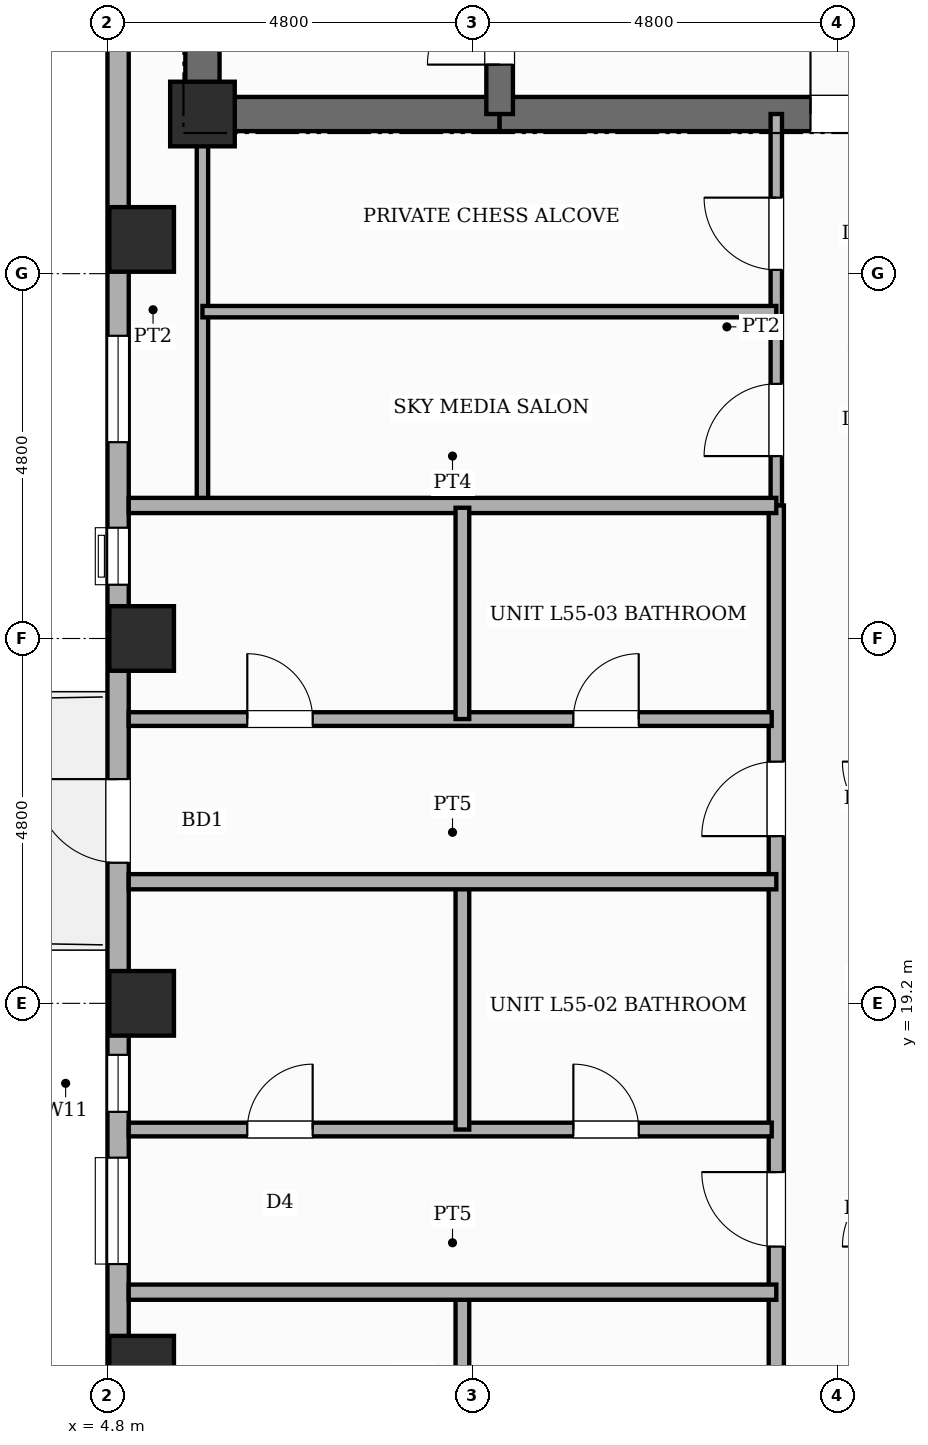
"""IFC4 building model, lengths in metres.
Left out: names, types, materials, properties, quantities, classifications, styles, units other than length and angle.
Written with IfcOpenShell. Run it as: python <this file> out.ifc"""

import sys

from ifc_helpers import new_model, si_unit, direction, frame, frame_2d, origin, origin_2d, place, context, subcontext, project, spatial, rectangle, extrude, element, fill, save


model = new_model("IFC4")
c1 = context("Model", 3, precision=1e-05, world=origin(), true_north=direction((0.0, 1.0)))
c2 = subcontext(c1, "Body", "Model", "MODEL_VIEW")
j1 = project(units=[si_unit("LENGTHUNIT", "METRE"), si_unit("PLANEANGLEUNIT", "RADIAN")], contexts=[c1])
p1 = place(None, origin())
s1 = spatial("IfcSite", under=j1, at=p1, CompositionType="ELEMENT")
p2 = place(p1, origin())
s2 = spatial("IfcBuilding", under=s1, at=p2, CompositionType="ELEMENT")
p3 = place(p2, frame((0.0, 0.0, 211.0)))
s3 = spatial("IfcBuildingStorey", under=s2, at=p3, CompositionType="ELEMENT", Elevation=211.0)
p4 = place(p3, frame((6.05, 30.675, 0.0), z_axis=(0.0, 0.0, 1.0), x_axis=(0.0, 1.0, 0.0)))
e1 = element("IfcWall", 1, at=p4, inside=s3, PredefinedType="SHEAR", context=c2, shape_type="SweptSolid", body=[
    extrude(rectangle(XDim=15.35, YDim=0.45, at=frame_2d((7.675, 0.0))), origin(), (0.0, 0.0, 1.0), 3.6),
])
p5 = place(p4, frame((10.675, 0.0, 0.0)))
e2 = element("IfcOpeningElement", 2, at=p5, cuts=e1, PredefinedType="OPENING", context=c2, shape_type="SweptSolid", body=[
    extrude(rectangle(XDim=0.95, YDim=2.15, at=frame_2d((0.475, 1.075))), frame((0.0, 0.235, 0.0), z_axis=(0.0, -1.0, 0.0), x_axis=(1.0, 0.0, 0.0)), (0.0, 0.0, 1.0), 0.47),
])
p6 = place(p3, frame((6.05, 30.9, 0.0), z_axis=(0.0, 0.0, 1.0), x_axis=(1.0, 0.0, 0.0)))
e3 = element("IfcWall", 3, at=p6, inside=s3, PredefinedType="SHEAR", context=c2, shape_type="SweptSolid", body=[
    extrude(rectangle(XDim=3.91, YDim=0.45, at=frame_2d((1.955, 0.0))), origin(), (0.0, 0.0, 1.0), 3.6),
])
p7 = place(p3, frame((9.96, 30.9, 0.0), z_axis=(0.0, 0.0, 1.0), x_axis=(1.0, 0.0, 0.0)))
e4 = element("IfcWall", 4, at=p7, inside=s3, PredefinedType="SHEAR", context=c2, shape_type="SweptSolid", body=[
    extrude(rectangle(XDim=8.88, YDim=0.45, at=frame_2d((4.44, 0.0))), origin(), (0.0, 0.0, 1.0), 3.6),
])
p8 = place(p7, frame((4.09, 0.0, 0.0)))
e5 = element("IfcOpeningElement", 5, at=p8, cuts=e4, PredefinedType="OPENING", context=c2, shape_type="SweptSolid", body=[
    extrude(rectangle(XDim=1.0, YDim=2.15, at=frame_2d((0.5, 1.075))), frame((0.0, 0.235, 0.0), z_axis=(0.0, -1.0, 0.0), x_axis=(1.0, 0.0, 0.0)), (0.0, 0.0, 1.0), 0.47),
])
p9 = place(p3, frame((9.96, 30.9, 0.0), z_axis=(0.0, 0.0, 1.0), x_axis=(0.0, 1.0, 0.0)))
e6 = element("IfcWall", 6, at=p9, inside=s3, PredefinedType="SHEAR", context=c2, shape_type="SweptSolid", body=[
    extrude(rectangle(XDim=14.9, YDim=0.35, at=frame_2d((7.45, 0.0))), origin(), (0.0, 0.0, 1.0), 3.6),
])
p10 = place(p9, frame((0.65, 0.0, 0.0)))
e7 = element("IfcOpeningElement", 7, at=p10, cuts=e6, PredefinedType="OPENING", context=c2, shape_type="SweptSolid", body=[
    extrude(rectangle(XDim=0.95, YDim=2.1, at=frame_2d((0.475, 1.05))), frame((0.0, 0.185, 0.0), z_axis=(0.0, -1.0, 0.0), x_axis=(1.0, 0.0, 0.0)), (0.0, 0.0, 1.0), 0.37),
])
p11 = place(p9, frame((10.45, 0.0, 0.0)))
e8 = element("IfcOpeningElement", 8, at=p11, cuts=e6, PredefinedType="OPENING", context=c2, shape_type="SweptSolid", body=[
    extrude(rectangle(XDim=1.0, YDim=2.15, at=frame_2d((0.5, 1.075))), frame((0.0, 0.185, 0.0), z_axis=(0.0, -1.0, 0.0), x_axis=(1.0, 0.0, 0.0)), (0.0, 0.0, 1.0), 0.37),
])
for number, where, z_axis, x_axis in (
    (9, (5.25, 14.4, 0.0), (0.0, 0.0, 1.0), (1.0, 0.0, 0.0)),
    (10, (5.25, 19.2, 0.0), (0.0, 0.0, 1.0), (1.0, 0.0, 0.0)),
    (11, (5.25, 24.0, 0.0), (0.0, 0.0, 1.0), (1.0, 0.0, 0.0)),
    (12, (5.25, 29.25, 0.0), (0.0, 0.0, 1.0), (1.0, 0.0, 0.0)),
    (13, (6.05, 30.9, 0.0), (0.0, 0.0, 1.0), (1.0, 0.0, 0.0)),
):
    element("IfcColumn", number, at=place(p3, frame(where, z_axis=z_axis, x_axis=x_axis)), inside=s3, PredefinedType="COLUMN", context=c2, shape_type="SweptSolid", body=[
        extrude(rectangle(XDim=0.85, YDim=0.85, at=origin_2d()), origin(), (0.0, 0.0, 1.0), 3.6),
    ])
p12 = place(p3, frame((4.94, 12.0, 0.0), z_axis=(0.0, 0.0, 1.0), x_axis=(0.0, 1.0, 0.0)))
e14 = element("IfcWall", 14, at=p12, inside=s3, PredefinedType="STANDARD", context=c2, shape_type="SweptSolid", body=[
    extrude(rectangle(XDim=33.6, YDim=0.28, at=frame_2d((16.8, 0.0))), origin(), (0.0, 0.0, 1.0), 2.66),
])
p13 = place(p12, frame((9.05, 0.0, 0.0)))
e15 = element("IfcOpeningElement", 15, at=p13, cuts=e14, PredefinedType="OPENING", context=c2, shape_type="SweptSolid", body=[
    extrude(rectangle(XDim=1.1, YDim=2.15, at=frame_2d((0.55, 1.075))), frame((0.0, 0.15, 0.0), z_axis=(0.0, -1.0, 0.0), x_axis=(1.0, 0.0, 0.0)), (0.0, 0.0, 1.0), 0.3),
])
p14 = place(p12, frame((3.77, 0.0, 0.65)))
e16 = element("IfcOpeningElement", 16, at=p14, cuts=e14, PredefinedType="OPENING", context=c2, shape_type="SweptSolid", body=[
    extrude(rectangle(XDim=1.4, YDim=1.1, at=frame_2d((0.7, 0.55))), frame((0.0, 0.15, 0.0), z_axis=(0.0, -1.0, 0.0), x_axis=(1.0, 0.0, 0.0)), (0.0, 0.0, 1.0), 0.3),
])
p15 = place(p12, frame((0.731, 0.0, 0.45)))
e17 = element("IfcOpeningElement", 17, at=p15, cuts=e14, PredefinedType="OPENING", context=c2, shape_type="SweptSolid", body=[
    extrude(rectangle(XDim=0.95, YDim=1.8, at=frame_2d((0.475, 0.9))), frame((0.0, 0.15, 0.0), z_axis=(0.0, -1.0, 0.0), x_axis=(1.0, 0.0, 0.0)), (0.0, 0.0, 1.0), 0.3),
])
p16 = place(p12, frame((5.772, 0.0, 0.45)))
e18 = element("IfcOpeningElement", 18, at=p16, cuts=e14, PredefinedType="OPENING", context=c2, shape_type="SweptSolid", body=[
    extrude(rectangle(XDim=0.75, YDim=1.8, at=frame_2d((0.375, 0.9))), frame((0.0, 0.15, 0.0), z_axis=(0.0, -1.0, 0.0), x_axis=(1.0, 0.0, 0.0)), (0.0, 0.0, 1.0), 0.3),
])
p17 = place(p12, frame((12.708, 0.0, 0.45)))
e19 = element("IfcOpeningElement", 19, at=p17, cuts=e14, PredefinedType="OPENING", context=c2, shape_type="SweptSolid", body=[
    extrude(rectangle(XDim=0.75, YDim=1.8, at=frame_2d((0.375, 0.9))), frame((0.0, 0.15, 0.0), z_axis=(0.0, -1.0, 0.0), x_axis=(1.0, 0.0, 0.0)), (0.0, 0.0, 1.0), 0.3),
])
p18 = place(p12, frame((14.583, 0.0, 0.65)))
e20 = element("IfcOpeningElement", 20, at=p18, cuts=e14, PredefinedType="OPENING", context=c2, shape_type="SweptSolid", body=[
    extrude(rectangle(XDim=1.4, YDim=1.1, at=frame_2d((0.7, 0.55))), frame((0.0, 0.15, 0.0), z_axis=(0.0, -1.0, 0.0), x_axis=(1.0, 0.0, 0.0)), (0.0, 0.0, 1.0), 0.3),
])
p19 = place(p3, frame((13.6, 25.75, 0.0), z_axis=(0.0, 0.0, 1.0), x_axis=(0.0, 1.0, 0.0)))
e21 = element("IfcWall", 21, at=p19, inside=s3, PredefinedType="PARTITIONING", context=c2, shape_type="SweptSolid", body=[
    extrude(rectangle(XDim=5.15, YDim=0.15, at=frame_2d((2.575, 0.0))), origin(), (0.0, 0.0, 1.0), 3.38),
])
p20 = place(p19, frame((0.65, 0.0, 0.0)))
e22 = element("IfcOpeningElement", 22, at=p20, cuts=e21, PredefinedType="OPENING", context=c2, shape_type="SweptSolid", body=[
    extrude(rectangle(XDim=0.95, YDim=2.15, at=frame_2d((0.475, 1.075))), frame((0.0, 0.085, 0.0), z_axis=(0.0, -1.0, 0.0), x_axis=(1.0, 0.0, 0.0)), (0.0, 0.0, 1.0), 0.17),
])
p21 = place(p19, frame((3.1, 0.0, 0.0)))
e23 = element("IfcOpeningElement", 23, at=p21, cuts=e21, PredefinedType="OPENING", context=c2, shape_type="SweptSolid", body=[
    extrude(rectangle(XDim=0.95, YDim=2.15, at=frame_2d((0.475, 1.075))), frame((0.0, 0.085, 0.0), z_axis=(0.0, -1.0, 0.0), x_axis=(1.0, 0.0, 0.0)), (0.0, 0.0, 1.0), 0.17),
])
p22 = place(p3, frame((6.05, 25.75, 0.0), z_axis=(0.0, 0.0, 1.0), x_axis=(0.0, 1.0, 0.0)))
e24 = element("IfcWall", 24, at=p22, inside=s3, PredefinedType="PARTITIONING", context=c2, shape_type="SweptSolid", body=[
    extrude(rectangle(XDim=5.15, YDim=0.15, at=frame_2d((2.575, 0.0))), origin(), (0.0, 0.0, 1.0), 3.38),
])
p23 = place(p3, frame((6.05, 28.3, 0.0), z_axis=(0.0, 0.0, 1.0), x_axis=(1.0, 0.0, 0.0)))
e25 = element("IfcWall", 25, at=p23, inside=s3, PredefinedType="PARTITIONING", context=c2, shape_type="SweptSolid", body=[
    extrude(rectangle(XDim=7.55, YDim=0.15, at=frame_2d((3.775, 0.0))), origin(), (0.0, 0.0, 1.0), 3.38),
])
p24 = place(p3, frame((13.6, 9.88, 0.0), z_axis=(0.0, 0.0, 1.0), x_axis=(0.0, 1.0, 0.0)))
e26 = element("IfcWall", 26, at=p24, inside=s3, PredefinedType="PARTITIONING", context=c2, shape_type="SweptSolid", body=[
    extrude(rectangle(XDim=15.87, YDim=0.2, at=frame_2d((7.935, 0.0))), origin(), (0.0, 0.0, 1.0), 3.38),
])
p25 = place(p24, frame((0.949, 0.0, 0.0)))
e27 = element("IfcOpeningElement", 27, at=p25, cuts=e26, PredefinedType="OPENING", context=c2, shape_type="SweptSolid", body=[
    extrude(rectangle(XDim=0.98, YDim=2.18, at=frame_2d((0.49, 1.09))), frame((0.0, 0.11, 0.0), z_axis=(0.0, -1.0, 0.0), x_axis=(1.0, 0.0, 0.0)), (0.0, 0.0, 1.0), 0.22),
])
p26 = place(p24, frame((6.12, 0.0, 0.0)))
e28 = element("IfcOpeningElement", 28, at=p26, cuts=e26, PredefinedType="OPENING", context=c2, shape_type="SweptSolid", body=[
    extrude(rectangle(XDim=0.98, YDim=2.18, at=frame_2d((0.49, 1.09))), frame((0.0, 0.11, 0.0), z_axis=(0.0, -1.0, 0.0), x_axis=(1.0, 0.0, 0.0)), (0.0, 0.0, 1.0), 0.22),
])
p27 = place(p24, frame((11.52, 0.0, 0.0)))
e29 = element("IfcOpeningElement", 29, at=p27, cuts=e26, PredefinedType="OPENING", context=c2, shape_type="SweptSolid", body=[
    extrude(rectangle(XDim=0.98, YDim=2.18, at=frame_2d((0.49, 1.09))), frame((0.0, 0.11, 0.0), z_axis=(0.0, -1.0, 0.0), x_axis=(1.0, 0.0, 0.0)), (0.0, 0.0, 1.0), 0.22),
])
p28 = place(p3, frame((5.08, 25.75, 0.0), z_axis=(0.0, 0.0, 1.0), x_axis=(1.0, 0.0, 0.0)))
e30 = element("IfcWall", 30, at=p28, inside=s3, PredefinedType="PARTITIONING", context=c2, shape_type="SweptSolid", body=[
    extrude(rectangle(XDim=8.52, YDim=0.2, at=frame_2d((4.26, 0.0))), origin(), (0.0, 0.0, 1.0), 3.38),
])
p29 = place(p3, frame((9.47, 12.458, 0.0), z_axis=(0.0, 0.0, 1.0), x_axis=(0.0, 1.0, 0.0)))
e31 = element("IfcWall", 31, at=p29, inside=s3, PredefinedType="PLUMBINGWALL", context=c2, shape_type="SweptSolid", body=[
    extrude(rectangle(XDim=2.982, YDim=0.18, at=frame_2d((1.491, 0.0))), origin(), (0.0, 0.0, 1.0), 3.38),
])
p30 = place(p3, frame((5.08, 15.4, 0.0), z_axis=(0.0, 0.0, 1.0), x_axis=(1.0, 0.0, 0.0)))
e32 = element("IfcWall", 32, at=p30, inside=s3, PredefinedType="SOLIDWALL", context=c2, shape_type="SweptSolid", body=[
    extrude(rectangle(XDim=8.52, YDim=0.2, at=frame_2d((4.26, 0.0))), origin(), (0.0, 0.0, 1.0), 3.38),
])
p31 = place(p3, frame((5.08, 17.54, 0.0), z_axis=(0.0, 0.0, 1.0), x_axis=(1.0, 0.0, 0.0)))
e33 = element("IfcWall", 33, at=p31, inside=s3, PredefinedType="PLUMBINGWALL", context=c2, shape_type="SweptSolid", body=[
    extrude(rectangle(XDim=8.46, YDim=0.18, at=frame_2d((4.23, 0.0))), origin(), (0.0, 0.0, 1.0), 3.38),
])
p32 = place(p31, frame((1.56, 0.0, 0.0)))
e34 = element("IfcOpeningElement", 34, at=p32, cuts=e33, PredefinedType="OPENING", context=c2, shape_type="SweptSolid", body=[
    extrude(rectangle(XDim=0.86, YDim=2.1, at=frame_2d((0.43, 1.05))), frame((0.0, 0.1, 0.0), z_axis=(0.0, -1.0, 0.0), x_axis=(1.0, 0.0, 0.0)), (0.0, 0.0, 1.0), 0.2),
])
p33 = place(p31, frame((5.85, 0.0, 0.0)))
e35 = element("IfcOpeningElement", 35, at=p33, cuts=e33, PredefinedType="OPENING", context=c2, shape_type="SweptSolid", body=[
    extrude(rectangle(XDim=0.86, YDim=2.1, at=frame_2d((0.43, 1.05))), frame((0.0, 0.1, 0.0), z_axis=(0.0, -1.0, 0.0), x_axis=(1.0, 0.0, 0.0)), (0.0, 0.0, 1.0), 0.2),
])
p34 = place(p3, frame((9.47, 17.54, 0.0), z_axis=(0.0, 0.0, 1.0), x_axis=(0.0, 1.0, 0.0)))
e36 = element("IfcWall", 36, at=p34, inside=s3, PredefinedType="PLUMBINGWALL", context=c2, shape_type="SweptSolid", body=[
    extrude(rectangle(XDim=3.3, YDim=0.18, at=frame_2d((1.65, 0.0))), origin(), (0.0, 0.0, 1.0), 3.38),
])
p35 = place(p3, frame((5.08, 20.8, 0.0), z_axis=(0.0, 0.0, 1.0), x_axis=(1.0, 0.0, 0.0)))
e37 = element("IfcWall", 37, at=p35, inside=s3, PredefinedType="SOLIDWALL", context=c2, shape_type="SweptSolid", body=[
    extrude(rectangle(XDim=8.52, YDim=0.2, at=frame_2d((4.26, 0.0))), origin(), (0.0, 0.0, 1.0), 3.38),
])
p36 = place(p3, frame((5.08, 22.94, 0.0), z_axis=(0.0, 0.0, 1.0), x_axis=(1.0, 0.0, 0.0)))
e38 = element("IfcWall", 38, at=p36, inside=s3, PredefinedType="PLUMBINGWALL", context=c2, shape_type="SweptSolid", body=[
    extrude(rectangle(XDim=8.46, YDim=0.18, at=frame_2d((4.23, 0.0))), origin(), (0.0, 0.0, 1.0), 3.38),
])
p37 = place(p36, frame((1.56, 0.0, 0.0)))
e39 = element("IfcOpeningElement", 39, at=p37, cuts=e38, PredefinedType="OPENING", context=c2, shape_type="SweptSolid", body=[
    extrude(rectangle(XDim=0.86, YDim=2.1, at=frame_2d((0.43, 1.05))), frame((0.0, 0.1, 0.0), z_axis=(0.0, -1.0, 0.0), x_axis=(1.0, 0.0, 0.0)), (0.0, 0.0, 1.0), 0.2),
])
p38 = place(p36, frame((5.85, 0.0, 0.0)))
e40 = element("IfcOpeningElement", 40, at=p38, cuts=e38, PredefinedType="OPENING", context=c2, shape_type="SweptSolid", body=[
    extrude(rectangle(XDim=0.86, YDim=2.1, at=frame_2d((0.43, 1.05))), frame((0.0, 0.1, 0.0), z_axis=(0.0, -1.0, 0.0), x_axis=(1.0, 0.0, 0.0)), (0.0, 0.0, 1.0), 0.2),
])
p39 = place(p3, frame((9.47, 22.94, 0.0), z_axis=(0.0, 0.0, 1.0), x_axis=(0.0, 1.0, 0.0)))
e41 = element("IfcWall", 41, at=p39, inside=s3, PredefinedType="PLUMBINGWALL", context=c2, shape_type="SweptSolid", body=[
    extrude(rectangle(XDim=2.78, YDim=0.18, at=frame_2d((1.39, 0.0))), origin(), (0.0, 0.0, 1.0), 3.38),
])
p40 = place(p13, origin())
e42 = element("IfcDoor", 42, at=p40, inside=s3, OperationType="SINGLE_SWING_RIGHT", PredefinedType="DOOR", context=c2, shape_type="SweptSolid", body=[
    extrude(rectangle(XDim=1.1, YDim=2.15, at=frame_2d((0.55, 1.075))), frame((0.0, 0.025, 0.0), z_axis=(0.0, -1.0, 0.0), x_axis=(1.0, 0.0, 0.0)), (0.0, 0.0, 1.0), 0.05),
])
fill(e15, e42)
p41 = place(p14, origin())
e43 = element("IfcWindow", 43, at=p41, inside=s3, PartitioningType="SINGLE_PANEL", PredefinedType="WINDOW", context=c2, shape_type="SweptSolid", body=[
    extrude(rectangle(XDim=1.4, YDim=1.1, at=frame_2d((0.7, 0.55))), frame((0.0, 0.03, 0.0), z_axis=(0.0, -1.0, 0.0), x_axis=(1.0, 0.0, 0.0)), (0.0, 0.0, 1.0), 0.06),
])
fill(e16, e43)
p42 = place(p16, origin())
e44 = element("IfcWindow", 44, at=p42, inside=s3, PartitioningType="SINGLE_PANEL", PredefinedType="WINDOW", context=c2, shape_type="SweptSolid", body=[
    extrude(rectangle(XDim=0.75, YDim=1.8, at=frame_2d((0.375, 0.9))), frame((0.0, 0.03, 0.0), z_axis=(0.0, -1.0, 0.0), x_axis=(1.0, 0.0, 0.0)), (0.0, 0.0, 1.0), 0.06),
])
fill(e18, e44)
p43 = place(p17, origin())
e45 = element("IfcWindow", 45, at=p43, inside=s3, PartitioningType="SINGLE_PANEL", PredefinedType="WINDOW", context=c2, shape_type="SweptSolid", body=[
    extrude(rectangle(XDim=0.75, YDim=1.8, at=frame_2d((0.375, 0.9))), frame((0.0, 0.03, 0.0), z_axis=(0.0, -1.0, 0.0), x_axis=(1.0, 0.0, 0.0)), (0.0, 0.0, 1.0), 0.06),
])
fill(e19, e45)
p44 = place(p18, origin())
e46 = element("IfcWindow", 46, at=p44, inside=s3, PartitioningType="SINGLE_PANEL", PredefinedType="WINDOW", context=c2, shape_type="SweptSolid", body=[
    extrude(rectangle(XDim=1.4, YDim=1.1, at=frame_2d((0.7, 0.55))), frame((0.0, 0.03, 0.0), z_axis=(0.0, -1.0, 0.0), x_axis=(1.0, 0.0, 0.0)), (0.0, 0.0, 1.0), 0.06),
])
fill(e20, e46)
p45 = place(p10, origin())
e47 = element("IfcDoor", 47, at=p45, inside=s3, OperationType="SINGLE_SWING_LEFT", PredefinedType="DOOR", context=c2, shape_type="SweptSolid", body=[
    extrude(rectangle(XDim=0.95, YDim=2.1, at=frame_2d((0.475, 1.05))), frame((0.0, 0.025, 0.0), z_axis=(0.0, -1.0, 0.0), x_axis=(1.0, 0.0, 0.0)), (0.0, 0.0, 1.0), 0.05),
])
fill(e7, e47)
p46 = place(p8, origin())
e48 = element("IfcDoor", 48, at=p46, inside=s3, OperationType="SINGLE_SWING_LEFT", PredefinedType="DOOR", context=c2, shape_type="SweptSolid", body=[
    extrude(rectangle(XDim=1.0, YDim=2.15, at=frame_2d((0.5, 1.075))), frame((0.0, 0.025, 0.0), z_axis=(0.0, -1.0, 0.0), x_axis=(1.0, 0.0, 0.0)), (0.0, 0.0, 1.0), 0.05),
])
fill(e5, e48)
p47 = place(p20, origin())
e49 = element("IfcDoor", 49, at=p47, inside=s3, OperationType="SINGLE_SWING_LEFT", PredefinedType="DOOR", context=c2, shape_type="SweptSolid", body=[
    extrude(rectangle(XDim=0.95, YDim=2.15, at=frame_2d((0.475, 1.075))), frame((0.0, 0.025, 0.0), z_axis=(0.0, -1.0, 0.0), x_axis=(1.0, 0.0, 0.0)), (0.0, 0.0, 1.0), 0.05),
])
fill(e22, e49)
p48 = place(p21, origin())
e50 = element("IfcDoor", 50, at=p48, inside=s3, OperationType="SINGLE_SWING_RIGHT", PredefinedType="DOOR", context=c2, shape_type="SweptSolid", body=[
    extrude(rectangle(XDim=0.95, YDim=2.15, at=frame_2d((0.475, 1.075))), frame((0.0, 0.025, 0.0), z_axis=(0.0, -1.0, 0.0), x_axis=(1.0, 0.0, 0.0)), (0.0, 0.0, 1.0), 0.05),
])
fill(e23, e50)
p49 = place(p26, origin())
e51 = element("IfcDoor", 51, at=p49, inside=s3, OperationType="SINGLE_SWING_RIGHT", PredefinedType="DOOR", context=c2, shape_type="SweptSolid", body=[
    extrude(rectangle(XDim=0.98, YDim=2.18, at=frame_2d((0.49, 1.09))), frame((0.0, 0.025, 0.0), z_axis=(0.0, -1.0, 0.0), x_axis=(1.0, 0.0, 0.0)), (0.0, 0.0, 1.0), 0.05),
])
fill(e28, e51)
p50 = place(p32, origin())
e52 = element("IfcDoor", 52, at=p50, inside=s3, OperationType="SINGLE_SWING_RIGHT", PredefinedType="DOOR", context=c2, shape_type="SweptSolid", body=[
    extrude(rectangle(XDim=0.86, YDim=2.1, at=frame_2d((0.43, 1.05))), frame((0.0, 0.025, 0.0), z_axis=(0.0, -1.0, 0.0), x_axis=(1.0, 0.0, 0.0)), (0.0, 0.0, 1.0), 0.05),
])
fill(e34, e52)
p51 = place(p33, origin())
e53 = element("IfcDoor", 53, at=p51, inside=s3, OperationType="SINGLE_SWING_LEFT", PredefinedType="DOOR", context=c2, shape_type="SweptSolid", body=[
    extrude(rectangle(XDim=0.86, YDim=2.1, at=frame_2d((0.43, 1.05))), frame((0.0, 0.025, 0.0), z_axis=(0.0, -1.0, 0.0), x_axis=(1.0, 0.0, 0.0)), (0.0, 0.0, 1.0), 0.05),
])
fill(e35, e53)
p52 = place(p27, origin())
e54 = element("IfcDoor", 54, at=p52, inside=s3, OperationType="SINGLE_SWING_LEFT", PredefinedType="DOOR", context=c2, shape_type="SweptSolid", body=[
    extrude(rectangle(XDim=0.98, YDim=2.18, at=frame_2d((0.49, 1.09))), frame((0.0, 0.025, 0.0), z_axis=(0.0, -1.0, 0.0), x_axis=(1.0, 0.0, 0.0)), (0.0, 0.0, 1.0), 0.05),
])
fill(e29, e54)
p53 = place(p37, origin())
e55 = element("IfcDoor", 55, at=p53, inside=s3, OperationType="SINGLE_SWING_LEFT", PredefinedType="DOOR", context=c2, shape_type="SweptSolid", body=[
    extrude(rectangle(XDim=0.86, YDim=2.1, at=frame_2d((0.43, 1.05))), frame((0.0, 0.025, 0.0), z_axis=(0.0, -1.0, 0.0), x_axis=(1.0, 0.0, 0.0)), (0.0, 0.0, 1.0), 0.05),
])
fill(e39, e55)
p54 = place(p38, origin())
e56 = element("IfcDoor", 56, at=p54, inside=s3, OperationType="SINGLE_SWING_RIGHT", PredefinedType="DOOR", context=c2, shape_type="SweptSolid", body=[
    extrude(rectangle(XDim=0.86, YDim=2.1, at=frame_2d((0.43, 1.05))), frame((0.0, 0.025, 0.0), z_axis=(0.0, -1.0, 0.0), x_axis=(1.0, 0.0, 0.0)), (0.0, 0.0, 1.0), 0.05),
])
fill(e40, e56)
save(model, sys.argv[1])
